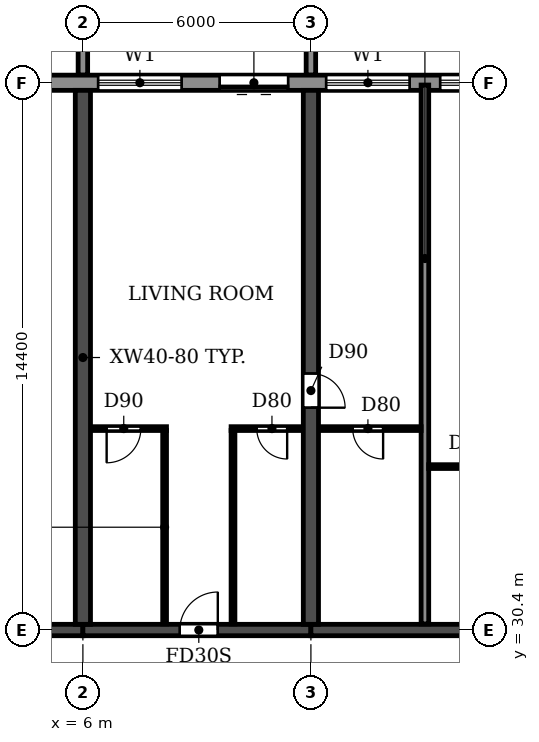
"""IFC4 building model, lengths in metres.
Left out: names, types, materials, properties, quantities, classifications, styles, units other than length and angle.
Written with IfcOpenShell. Run it as: python <this file> out.ifc"""

import sys

from ifc_helpers import new_model, si_unit, direction, frame, frame_2d, origin, place, context, subcontext, project, spatial, polyline, rectangle, outline, extrude, source, transform, mapped, element, fill, save


model = new_model("IFC4")
c1 = context("Model", 3, precision=1e-05, world=origin(), true_north=direction((0.0, 1.0)))
c2 = subcontext(c1, "Body", "Model", "MODEL_VIEW")
j1 = project(units=[si_unit("LENGTHUNIT", "METRE"), si_unit("PLANEANGLEUNIT", "RADIAN")], contexts=[c1])
p1 = place(None, origin())
s1 = spatial("IfcSite", under=j1, at=p1, CompositionType="ELEMENT")
p2 = place(p1, origin())
s2 = spatial("IfcBuilding", under=s1, at=p2, CompositionType="ELEMENT")
p3 = place(p2, frame((0.0, 0.0, 26.7)))
s3 = spatial("IfcBuildingStorey", under=s2, at=p3, CompositionType="ELEMENT", Elevation=26.7)
p4 = place(p3, frame((6.0, 30.55, 0.0), z_axis=(0.0, 0.0, 1.0), x_axis=(0.0, 1.0, 0.0)))
e1 = element("IfcWall", 1, at=p4, inside=s3, PredefinedType="SHEAR", context=c2, shape_type="SweptSolid", body=[
    extrude(rectangle(XDim=14.05, YDim=0.4, at=frame_2d((7.025, 0.0))), origin(), (0.0, 0.0, 1.0), 3.05),
])
p5 = place(p3, frame((12.0, 30.55, 0.0), z_axis=(0.0, 0.0, 1.0), x_axis=(0.0, 1.0, 0.0)))
e2 = element("IfcWall", 2, at=p5, inside=s3, PredefinedType="SHEAR", context=c2, shape_type="SweptSolid", body=[
    extrude(rectangle(XDim=14.05, YDim=0.4, at=frame_2d((7.025, 0.0))), origin(), (0.0, 0.0, 1.0), 3.05),
])
p6 = place(p5, frame((5.7, 0.0, 0.0)))
e3 = element("IfcOpeningElement", 3, at=p6, cuts=e2, PredefinedType="OPENING", context=c2, shape_type="SweptSolid", body=[
    extrude(rectangle(XDim=0.9, YDim=2.1, at=frame_2d((0.45, 1.05))), frame((0.0, 0.21, 0.0), z_axis=(0.0, -1.0, 0.0), x_axis=(1.0, 0.0, 0.0)), (0.0, 0.0, 1.0), 0.42),
])
p7 = place(p3, frame((0.2, 30.4, 0.0), z_axis=(0.0, 0.0, 1.0), x_axis=(1.0, 0.0, 0.0)))
e4 = element("IfcWall", 4, at=p7, inside=s3, PredefinedType="SHEAR", context=c2, shape_type="SweptSolid", body=[
    extrude(rectangle(XDim=5.8, YDim=0.3, at=frame_2d((2.9, 0.0))), origin(), (0.0, 0.0, 1.0), 2.45),
])
p8 = place(p7, frame((2.3, 0.0, 0.0)))
e5 = element("IfcOpeningElement", 5, at=p8, cuts=e4, PredefinedType="OPENING", context=c2, shape_type="SweptSolid", body=[
    extrude(rectangle(XDim=1.0, YDim=2.1, at=frame_2d((0.5, 1.05))), frame((0.0, 0.16, 0.0), z_axis=(0.0, -1.0, 0.0), x_axis=(1.0, 0.0, 0.0)), (0.0, 0.0, 1.0), 0.32),
])
p9 = place(p3, frame((6.0, 30.4, 0.0), z_axis=(0.0, 0.0, 1.0), x_axis=(1.0, 0.0, 0.0)))
e6 = element("IfcWall", 6, at=p9, inside=s3, PredefinedType="SHEAR", context=c2, shape_type="SweptSolid", body=[
    extrude(rectangle(XDim=6.0, YDim=0.3, at=frame_2d((3.0, 0.0))), origin(), (0.0, 0.0, 1.0), 2.45),
])
p10 = place(p9, frame((2.55, 0.0, 0.0)))
e7 = element("IfcOpeningElement", 7, at=p10, cuts=e6, PredefinedType="OPENING", context=c2, shape_type="SweptSolid", body=[
    extrude(rectangle(XDim=1.0, YDim=2.1, at=frame_2d((0.5, 1.05))), frame((0.0, 0.16, 0.0), z_axis=(0.0, -1.0, 0.0), x_axis=(1.0, 0.0, 0.0)), (0.0, 0.0, 1.0), 0.32),
])
p11 = place(p3, frame((12.0, 30.4, 0.0), z_axis=(0.0, 0.0, 1.0), x_axis=(1.0, 0.0, 0.0)))
e8 = element("IfcWall", 8, at=p11, inside=s3, PredefinedType="SHEAR", context=c2, shape_type="SweptSolid", body=[
    extrude(rectangle(XDim=6.0, YDim=0.3, at=frame_2d((3.0, 0.0))), origin(), (0.0, 0.0, 1.0), 2.45),
])
p12 = place(p3, frame((97.317, 44.8, 0.0), z_axis=(0.0, 0.0, 1.0), x_axis=(-1.0, 0.0, 0.0)))
e9 = element("IfcWall", 9, at=p12, inside=s3, PredefinedType="STANDARD", context=c2, shape_type="SweptSolid", body=[
    extrude(rectangle(XDim=92.634, YDim=0.4, at=frame_2d((46.317, 0.0))), origin(), (0.0, 0.0, 1.0), 3.05),
])
p13 = place(p12, frame((88.717, 0.0, 0.9)))
e10 = element("IfcOpeningElement", 10, at=p13, cuts=e9, PredefinedType="OPENING", context=c2, shape_type="SweptSolid", body=[
    extrude(rectangle(XDim=2.2, YDim=1.5, at=frame_2d((1.1, 0.75))), frame((0.0, 0.21, 0.0), z_axis=(0.0, -1.0, 0.0), x_axis=(1.0, 0.0, 0.0)), (0.0, 0.0, 1.0), 0.42),
])
p14 = place(p12, frame((85.917, 0.0, 0.0)))
e11 = element("IfcOpeningElement", 11, at=p14, cuts=e9, PredefinedType="OPENING", context=c2, shape_type="SweptSolid", body=[
    extrude(rectangle(XDim=1.8, YDim=2.4, at=frame_2d((0.9, 1.2))), frame((0.0, 0.21, 0.0), z_axis=(0.0, -1.0, 0.0), x_axis=(1.0, 0.0, 0.0)), (0.0, 0.0, 1.0), 0.42),
])
p15 = place(p12, frame((82.717, 0.0, 0.9)))
e12 = element("IfcOpeningElement", 12, at=p15, cuts=e9, PredefinedType="OPENING", context=c2, shape_type="SweptSolid", body=[
    extrude(rectangle(XDim=2.2, YDim=1.5, at=frame_2d((1.1, 0.75))), frame((0.0, 0.21, 0.0), z_axis=(0.0, -1.0, 0.0), x_axis=(1.0, 0.0, 0.0)), (0.0, 0.0, 1.0), 0.42),
])
p16 = place(p12, frame((79.717, 0.0, 0.9)))
e13 = element("IfcOpeningElement", 13, at=p16, cuts=e9, PredefinedType="OPENING", context=c2, shape_type="SweptSolid", body=[
    extrude(rectangle(XDim=2.2, YDim=1.5, at=frame_2d((1.1, 0.75))), frame((0.0, 0.21, 0.0), z_axis=(0.0, -1.0, 0.0), x_axis=(1.0, 0.0, 0.0)), (0.0, 0.0, 1.0), 0.42),
])
p17 = place(p12, frame((76.917, 0.0, 0.0)))
e14 = element("IfcOpeningElement", 14, at=p17, cuts=e9, PredefinedType="OPENING", context=c2, shape_type="SweptSolid", body=[
    extrude(rectangle(XDim=1.8, YDim=2.4, at=frame_2d((0.9, 1.2))), frame((0.0, 0.21, 0.0), z_axis=(0.0, -1.0, 0.0), x_axis=(1.0, 0.0, 0.0)), (0.0, 0.0, 1.0), 0.42),
])
p18 = place(p12, frame((73.717, 0.0, 0.9)))
e15 = element("IfcOpeningElement", 15, at=p18, cuts=e9, PredefinedType="OPENING", context=c2, shape_type="SweptSolid", body=[
    extrude(rectangle(XDim=2.2, YDim=1.5, at=frame_2d((1.1, 0.75))), frame((0.0, 0.21, 0.0), z_axis=(0.0, -1.0, 0.0), x_axis=(1.0, 0.0, 0.0)), (0.0, 0.0, 1.0), 0.42),
])
p19 = place(p12, frame((70.717, 0.0, 0.9)))
e16 = element("IfcOpeningElement", 16, at=p19, cuts=e9, PredefinedType="OPENING", context=c2, shape_type="SweptSolid", body=[
    extrude(rectangle(XDim=2.2, YDim=1.5, at=frame_2d((1.1, 0.75))), frame((0.0, 0.21, 0.0), z_axis=(0.0, -1.0, 0.0), x_axis=(1.0, 0.0, 0.0)), (0.0, 0.0, 1.0), 0.42),
])
p20 = place(p12, frame((67.717, 0.0, 0.9)))
e17 = element("IfcOpeningElement", 17, at=p20, cuts=e9, PredefinedType="OPENING", context=c2, shape_type="SweptSolid", body=[
    extrude(rectangle(XDim=2.2, YDim=1.5, at=frame_2d((1.1, 0.75))), frame((0.0, 0.21, 0.0), z_axis=(0.0, -1.0, 0.0), x_axis=(1.0, 0.0, 0.0)), (0.0, 0.0, 1.0), 0.42),
])
p21 = place(p12, frame((64.917, 0.0, 0.0)))
e18 = element("IfcOpeningElement", 18, at=p21, cuts=e9, PredefinedType="OPENING", context=c2, shape_type="SweptSolid", body=[
    extrude(rectangle(XDim=1.8, YDim=2.4, at=frame_2d((0.9, 1.2))), frame((0.0, 0.21, 0.0), z_axis=(0.0, -1.0, 0.0), x_axis=(1.0, 0.0, 0.0)), (0.0, 0.0, 1.0), 0.42),
])
p22 = place(p12, frame((61.717, 0.0, 0.9)))
e19 = element("IfcOpeningElement", 19, at=p22, cuts=e9, PredefinedType="OPENING", context=c2, shape_type="SweptSolid", body=[
    extrude(rectangle(XDim=2.2, YDim=1.5, at=frame_2d((1.1, 0.75))), frame((0.0, 0.21, 0.0), z_axis=(0.0, -1.0, 0.0), x_axis=(1.0, 0.0, 0.0)), (0.0, 0.0, 1.0), 0.42),
])
p23 = place(p12, frame((58.717, 0.0, 0.9)))
e20 = element("IfcOpeningElement", 20, at=p23, cuts=e9, PredefinedType="OPENING", context=c2, shape_type="SweptSolid", body=[
    extrude(rectangle(XDim=2.2, YDim=1.5, at=frame_2d((1.1, 0.75))), frame((0.0, 0.21, 0.0), z_axis=(0.0, -1.0, 0.0), x_axis=(1.0, 0.0, 0.0)), (0.0, 0.0, 1.0), 0.42),
])
p24 = place(p12, frame((55.917, 0.0, 0.0)))
e21 = element("IfcOpeningElement", 21, at=p24, cuts=e9, PredefinedType="OPENING", context=c2, shape_type="SweptSolid", body=[
    extrude(rectangle(XDim=1.8, YDim=2.4, at=frame_2d((0.9, 1.2))), frame((0.0, 0.21, 0.0), z_axis=(0.0, -1.0, 0.0), x_axis=(1.0, 0.0, 0.0)), (0.0, 0.0, 1.0), 0.42),
])
p25 = place(p12, frame((52.917, 0.0, 0.0)))
e22 = element("IfcOpeningElement", 22, at=p25, cuts=e9, PredefinedType="OPENING", context=c2, shape_type="SweptSolid", body=[
    extrude(rectangle(XDim=1.8, YDim=2.4, at=frame_2d((0.9, 1.2))), frame((0.0, 0.21, 0.0), z_axis=(0.0, -1.0, 0.0), x_axis=(1.0, 0.0, 0.0)), (0.0, 0.0, 1.0), 0.42),
])
p26 = place(p12, frame((49.717, 0.0, 0.9)))
e23 = element("IfcOpeningElement", 23, at=p26, cuts=e9, PredefinedType="OPENING", context=c2, shape_type="SweptSolid", body=[
    extrude(rectangle(XDim=2.2, YDim=1.5, at=frame_2d((1.1, 0.75))), frame((0.0, 0.21, 0.0), z_axis=(0.0, -1.0, 0.0), x_axis=(1.0, 0.0, 0.0)), (0.0, 0.0, 1.0), 0.42),
])
p27 = place(p12, frame((46.917, 0.0, 0.0)))
e24 = element("IfcOpeningElement", 24, at=p27, cuts=e9, PredefinedType="OPENING", context=c2, shape_type="SweptSolid", body=[
    extrude(rectangle(XDim=1.8, YDim=2.4, at=frame_2d((0.9, 1.2))), frame((0.0, 0.21, 0.0), z_axis=(0.0, -1.0, 0.0), x_axis=(1.0, 0.0, 0.0)), (0.0, 0.0, 1.0), 0.42),
])
p28 = place(p12, frame((43.717, 0.0, 0.9)))
e25 = element("IfcOpeningElement", 25, at=p28, cuts=e9, PredefinedType="OPENING", context=c2, shape_type="SweptSolid", body=[
    extrude(rectangle(XDim=2.2, YDim=1.5, at=frame_2d((1.1, 0.75))), frame((0.0, 0.21, 0.0), z_axis=(0.0, -1.0, 0.0), x_axis=(1.0, 0.0, 0.0)), (0.0, 0.0, 1.0), 0.42),
])
p29 = place(p12, frame((40.717, 0.0, 0.9)))
e26 = element("IfcOpeningElement", 26, at=p29, cuts=e9, PredefinedType="OPENING", context=c2, shape_type="SweptSolid", body=[
    extrude(rectangle(XDim=2.2, YDim=1.5, at=frame_2d((1.1, 0.75))), frame((0.0, 0.21, 0.0), z_axis=(0.0, -1.0, 0.0), x_axis=(1.0, 0.0, 0.0)), (0.0, 0.0, 1.0), 0.42),
])
p30 = place(p12, frame((37.917, 0.0, 0.0)))
e27 = element("IfcOpeningElement", 27, at=p30, cuts=e9, PredefinedType="OPENING", context=c2, shape_type="SweptSolid", body=[
    extrude(rectangle(XDim=1.8, YDim=2.4, at=frame_2d((0.9, 1.2))), frame((0.0, 0.21, 0.0), z_axis=(0.0, -1.0, 0.0), x_axis=(1.0, 0.0, 0.0)), (0.0, 0.0, 1.0), 0.42),
])
p31 = place(p12, frame((34.917, 0.0, 0.0)))
e28 = element("IfcOpeningElement", 28, at=p31, cuts=e9, PredefinedType="OPENING", context=c2, shape_type="SweptSolid", body=[
    extrude(rectangle(XDim=1.8, YDim=2.4, at=frame_2d((0.9, 1.2))), frame((0.0, 0.21, 0.0), z_axis=(0.0, -1.0, 0.0), x_axis=(1.0, 0.0, 0.0)), (0.0, 0.0, 1.0), 0.42),
])
p32 = place(p12, frame((31.717, 0.0, 0.9)))
e29 = element("IfcOpeningElement", 29, at=p32, cuts=e9, PredefinedType="OPENING", context=c2, shape_type="SweptSolid", body=[
    extrude(rectangle(XDim=2.2, YDim=1.5, at=frame_2d((1.1, 0.75))), frame((0.0, 0.21, 0.0), z_axis=(0.0, -1.0, 0.0), x_axis=(1.0, 0.0, 0.0)), (0.0, 0.0, 1.0), 0.42),
])
p33 = place(p12, frame((28.717, 0.0, 0.9)))
e30 = element("IfcOpeningElement", 30, at=p33, cuts=e9, PredefinedType="OPENING", context=c2, shape_type="SweptSolid", body=[
    extrude(rectangle(XDim=2.2, YDim=1.5, at=frame_2d((1.1, 0.75))), frame((0.0, 0.21, 0.0), z_axis=(0.0, -1.0, 0.0), x_axis=(1.0, 0.0, 0.0)), (0.0, 0.0, 1.0), 0.42),
])
p34 = place(p12, frame((25.717, 0.0, 0.9)))
e31 = element("IfcOpeningElement", 31, at=p34, cuts=e9, PredefinedType="OPENING", context=c2, shape_type="SweptSolid", body=[
    extrude(rectangle(XDim=2.2, YDim=1.5, at=frame_2d((1.1, 0.75))), frame((0.0, 0.21, 0.0), z_axis=(0.0, -1.0, 0.0), x_axis=(1.0, 0.0, 0.0)), (0.0, 0.0, 1.0), 0.42),
])
p35 = place(p12, frame((22.717, 0.0, 0.9)))
e32 = element("IfcOpeningElement", 32, at=p35, cuts=e9, PredefinedType="OPENING", context=c2, shape_type="SweptSolid", body=[
    extrude(rectangle(XDim=2.2, YDim=1.5, at=frame_2d((1.1, 0.75))), frame((0.0, 0.21, 0.0), z_axis=(0.0, -1.0, 0.0), x_axis=(1.0, 0.0, 0.0)), (0.0, 0.0, 1.0), 0.42),
])
p36 = place(p12, frame((19.917, 0.0, 0.0)))
e33 = element("IfcOpeningElement", 33, at=p36, cuts=e9, PredefinedType="OPENING", context=c2, shape_type="SweptSolid", body=[
    extrude(rectangle(XDim=1.8, YDim=2.4, at=frame_2d((0.9, 1.2))), frame((0.0, 0.21, 0.0), z_axis=(0.0, -1.0, 0.0), x_axis=(1.0, 0.0, 0.0)), (0.0, 0.0, 1.0), 0.42),
])
p37 = place(p12, frame((16.717, 0.0, 0.9)))
e34 = element("IfcOpeningElement", 34, at=p37, cuts=e9, PredefinedType="OPENING", context=c2, shape_type="SweptSolid", body=[
    extrude(rectangle(XDim=2.2, YDim=1.5, at=frame_2d((1.1, 0.75))), frame((0.0, 0.21, 0.0), z_axis=(0.0, -1.0, 0.0), x_axis=(1.0, 0.0, 0.0)), (0.0, 0.0, 1.0), 0.42),
])
p38 = place(p12, frame((13.717, 0.0, 0.9)))
e35 = element("IfcOpeningElement", 35, at=p38, cuts=e9, PredefinedType="OPENING", context=c2, shape_type="SweptSolid", body=[
    extrude(rectangle(XDim=2.2, YDim=1.5, at=frame_2d((1.1, 0.75))), frame((0.0, 0.21, 0.0), z_axis=(0.0, -1.0, 0.0), x_axis=(1.0, 0.0, 0.0)), (0.0, 0.0, 1.0), 0.42),
])
p39 = place(p12, frame((10.717, 0.0, 0.9)))
e36 = element("IfcOpeningElement", 36, at=p39, cuts=e9, PredefinedType="OPENING", context=c2, shape_type="SweptSolid", body=[
    extrude(rectangle(XDim=2.2, YDim=1.5, at=frame_2d((1.1, 0.75))), frame((0.0, 0.21, 0.0), z_axis=(0.0, -1.0, 0.0), x_axis=(1.0, 0.0, 0.0)), (0.0, 0.0, 1.0), 0.42),
])
p40 = place(p12, frame((7.917, 0.0, 0.0)))
e37 = element("IfcOpeningElement", 37, at=p40, cuts=e9, PredefinedType="OPENING", context=c2, shape_type="SweptSolid", body=[
    extrude(rectangle(XDim=1.8, YDim=2.4, at=frame_2d((0.9, 1.2))), frame((0.0, 0.21, 0.0), z_axis=(0.0, -1.0, 0.0), x_axis=(1.0, 0.0, 0.0)), (0.0, 0.0, 1.0), 0.42),
])
p41 = place(p12, frame((4.917, 0.0, 0.0)))
e38 = element("IfcOpeningElement", 38, at=p41, cuts=e9, PredefinedType="OPENING", context=c2, shape_type="SweptSolid", body=[
    extrude(rectangle(XDim=1.8, YDim=2.4, at=frame_2d((0.9, 1.2))), frame((0.0, 0.21, 0.0), z_axis=(0.0, -1.0, 0.0), x_axis=(1.0, 0.0, 0.0)), (0.0, 0.0, 1.0), 0.42),
])
p42 = place(p12, frame((1.717, 0.0, 0.9)))
e39 = element("IfcOpeningElement", 39, at=p42, cuts=e9, PredefinedType="OPENING", context=c2, shape_type="SweptSolid", body=[
    extrude(rectangle(XDim=2.2, YDim=1.5, at=frame_2d((1.1, 0.75))), frame((0.0, 0.21, 0.0), z_axis=(0.0, -1.0, 0.0), x_axis=(1.0, 0.0, 0.0)), (0.0, 0.0, 1.0), 0.42),
])
m1 = source(origin(), c2, "Body", "SweptSolid", [
    extrude(outline(polyline([(0.0, 0.0), (0.25, 0.0), (0.25, 3.1), (0.0, 3.1), (0.0, 0.0)])), origin(), (0.0, 0.0, 1.0), 3.1),
])
for number, where in (
    (40, (5.875, 45.0, 0.0)),
    (41, (11.875, 45.0, 0.0)),
):
    element("IfcWall", number, at=place(p3, frame(where)), inside=s3, PredefinedType="STANDARD", context=c2, shape_type="MappedRepresentation", body=[
        mapped(m1, transform((0.0, 0.0, 0.0))),
    ])
p43 = place(p3, frame((15.0, 30.56, 0.0), z_axis=(0.0, 0.0, 1.0), x_axis=(0.0, 1.0, 0.0)))
e42 = element("IfcWall", 42, at=p43, inside=s3, PredefinedType="PARTITIONING", context=c2, shape_type="SweptSolid", body=[
    extrude(rectangle(XDim=14.18, YDim=0.2, at=frame_2d((7.09, 0.0))), origin(), (0.0, 0.0, 1.0), 3.05),
])
p44 = place(p3, frame((15.1, 34.7, 0.0), z_axis=(0.0, 0.0, 1.0), x_axis=(1.0, 0.0, 0.0)))
e43 = element("IfcWall", 43, at=p44, inside=s3, PredefinedType="PARTITIONING", context=c2, shape_type="SweptSolid", body=[
    extrude(rectangle(XDim=2.69, YDim=0.1, at=frame_2d((1.345, 0.0))), origin(), (0.0, 0.0, 1.0), 3.05),
])
p45 = place(p44, frame((1.0, 0.0, 0.0)))
e44 = element("IfcOpeningElement", 44, at=p45, cuts=e43, PredefinedType="OPENING", context=c2, shape_type="SweptSolid", body=[
    extrude(rectangle(XDim=0.8, YDim=2.1, at=frame_2d((0.4, 1.05))), frame((0.0, 0.06, 0.0), z_axis=(0.0, -1.0, 0.0), x_axis=(1.0, 0.0, 0.0)), (0.0, 0.0, 1.0), 0.12),
])
p46 = place(p3, frame((6.21, 35.7, 0.0), z_axis=(0.0, 0.0, 1.0), x_axis=(1.0, 0.0, 0.0)))
e45 = element("IfcWall", 45, at=p46, inside=s3, PredefinedType="PARTITIONING", context=c2, shape_type="SweptSolid", body=[
    extrude(rectangle(XDim=1.99, YDim=0.1, at=frame_2d((0.995, 0.0))), origin(), (0.0, 0.0, 1.0), 3.05),
])
p47 = place(p46, frame((0.415, 0.0, 0.0)))
e46 = element("IfcOpeningElement", 46, at=p47, cuts=e45, PredefinedType="OPENING", context=c2, shape_type="SweptSolid", body=[
    extrude(rectangle(XDim=0.9, YDim=2.1, at=frame_2d((0.45, 1.05))), frame((0.0, 0.06, 0.0), z_axis=(0.0, -1.0, 0.0), x_axis=(1.0, 0.0, 0.0)), (0.0, 0.0, 1.0), 0.12),
])
p48 = place(p3, frame((9.9, 35.7, 0.0), z_axis=(0.0, 0.0, 1.0), x_axis=(1.0, 0.0, 0.0)))
e47 = element("IfcWall", 47, at=p48, inside=s3, PredefinedType="PARTITIONING", context=c2, shape_type="SweptSolid", body=[
    extrude(rectangle(XDim=1.89, YDim=0.1, at=frame_2d((0.945, 0.0))), origin(), (0.0, 0.0, 1.0), 3.05),
])
p49 = place(p48, frame((0.675, 0.0, 0.0)))
e48 = element("IfcOpeningElement", 48, at=p49, cuts=e47, PredefinedType="OPENING", context=c2, shape_type="SweptSolid", body=[
    extrude(rectangle(XDim=0.8, YDim=2.1, at=frame_2d((0.4, 1.05))), frame((0.0, 0.06, 0.0), z_axis=(0.0, -1.0, 0.0), x_axis=(1.0, 0.0, 0.0)), (0.0, 0.0, 1.0), 0.12),
])
p50 = place(p3, frame((12.21, 35.7, 0.0), z_axis=(0.0, 0.0, 1.0), x_axis=(1.0, 0.0, 0.0)))
e49 = element("IfcWall", 49, at=p50, inside=s3, PredefinedType="PARTITIONING", context=c2, shape_type="SweptSolid", body=[
    extrude(rectangle(XDim=2.69, YDim=0.1, at=frame_2d((1.345, 0.0))), origin(), (0.0, 0.0, 1.0), 3.05),
])
p51 = place(p50, frame((0.89, 0.0, 0.0)))
e50 = element("IfcOpeningElement", 50, at=p51, cuts=e49, PredefinedType="OPENING", context=c2, shape_type="SweptSolid", body=[
    extrude(rectangle(XDim=0.8, YDim=2.1, at=frame_2d((0.4, 1.05))), frame((0.0, 0.06, 0.0), z_axis=(0.0, -1.0, 0.0), x_axis=(1.0, 0.0, 0.0)), (0.0, 0.0, 1.0), 0.12),
])
for number, where, z_axis, x_axis in (
    (51, (8.15, 30.56, 0.0), (0.0, 0.0, 1.0), (0.0, 1.0, 0.0)),
    (52, (9.95, 30.56, 0.0), (0.0, 0.0, 1.0), (0.0, 1.0, 0.0)),
):
    element("IfcWall", number, at=place(p3, frame(where, z_axis=z_axis, x_axis=x_axis)), inside=s3, PredefinedType="PARTITIONING", context=c2, shape_type="SweptSolid", body=[
        extrude(rectangle(XDim=5.09, YDim=0.1, at=frame_2d((2.545, 0.0))), origin(), (0.0, 0.0, 1.0), 3.05),
    ])
p52 = place(p13, origin())
e53 = element("IfcWindow", 53, at=p52, inside=s3, PartitioningType="DOUBLE_PANEL_HORIZONTAL", PredefinedType="WINDOW", context=c2, shape_type="SweptSolid", body=[
    extrude(rectangle(XDim=2.2, YDim=1.5, at=frame_2d((1.1, 0.75))), frame((0.0, 0.03, 0.0), z_axis=(0.0, -1.0, 0.0), x_axis=(1.0, 0.0, 0.0)), (0.0, 0.0, 1.0), 0.06),
])
fill(e10, e53)
p53 = place(p14, origin())
e54 = element("IfcDoor", 54, at=p53, inside=s3, OperationType="DOUBLE_DOOR_SLIDING", PredefinedType="DOOR", context=c2, shape_type="SweptSolid", body=[
    extrude(rectangle(XDim=1.8, YDim=2.4, at=frame_2d((0.9, 1.2))), frame((0.0, 0.025, 0.0), z_axis=(0.0, -1.0, 0.0), x_axis=(1.0, 0.0, 0.0)), (0.0, 0.0, 1.0), 0.05),
])
fill(e11, e54)
p54 = place(p15, origin())
e55 = element("IfcWindow", 55, at=p54, inside=s3, PartitioningType="DOUBLE_PANEL_HORIZONTAL", PredefinedType="WINDOW", context=c2, shape_type="SweptSolid", body=[
    extrude(rectangle(XDim=2.2, YDim=1.5, at=frame_2d((1.1, 0.75))), frame((0.0, 0.03, 0.0), z_axis=(0.0, -1.0, 0.0), x_axis=(1.0, 0.0, 0.0)), (0.0, 0.0, 1.0), 0.06),
])
fill(e12, e55)
p55 = place(p16, origin())
e56 = element("IfcWindow", 56, at=p55, inside=s3, PartitioningType="DOUBLE_PANEL_HORIZONTAL", PredefinedType="WINDOW", context=c2, shape_type="SweptSolid", body=[
    extrude(rectangle(XDim=2.2, YDim=1.5, at=frame_2d((1.1, 0.75))), frame((0.0, 0.03, 0.0), z_axis=(0.0, -1.0, 0.0), x_axis=(1.0, 0.0, 0.0)), (0.0, 0.0, 1.0), 0.06),
])
fill(e13, e56)
p56 = place(p51, frame((0.8, 0.0, 0.0), z_axis=(0.0, 0.0, 1.0), x_axis=(-1.0, 0.0, 0.0)))
e57 = element("IfcDoor", 57, at=p56, inside=s3, OperationType="SINGLE_SWING_LEFT", PredefinedType="DOOR", context=c2, shape_type="SweptSolid", body=[
    extrude(rectangle(XDim=0.8, YDim=2.1, at=frame_2d((0.4, 1.05))), frame((0.0, 0.025, 0.0), z_axis=(0.0, -1.0, 0.0), x_axis=(1.0, 0.0, 0.0)), (0.0, 0.0, 1.0), 0.05),
])
fill(e50, e57)
p57 = place(p47, frame((0.9, 0.0, 0.0), z_axis=(0.0, 0.0, 1.0), x_axis=(-1.0, 0.0, 0.0)))
e58 = element("IfcDoor", 58, at=p57, inside=s3, OperationType="SINGLE_SWING_RIGHT", PredefinedType="DOOR", context=c2, shape_type="SweptSolid", body=[
    extrude(rectangle(XDim=0.9, YDim=2.1, at=frame_2d((0.45, 1.05))), frame((0.0, 0.025, 0.0), z_axis=(0.0, -1.0, 0.0), x_axis=(1.0, 0.0, 0.0)), (0.0, 0.0, 1.0), 0.05),
])
fill(e46, e58)
p58 = place(p10, origin())
e59 = element("IfcDoor", 59, at=p58, inside=s3, OperationType="SINGLE_SWING_RIGHT", PredefinedType="DOOR", context=c2, shape_type="SweptSolid", body=[
    extrude(rectangle(XDim=1.0, YDim=2.1, at=frame_2d((0.5, 1.05))), frame((0.0, 0.025, 0.0), z_axis=(0.0, -1.0, 0.0), x_axis=(1.0, 0.0, 0.0)), (0.0, 0.0, 1.0), 0.05),
])
fill(e7, e59)
p59 = place(p49, frame((0.8, 0.0, 0.0), z_axis=(0.0, 0.0, 1.0), x_axis=(-1.0, 0.0, 0.0)))
e60 = element("IfcDoor", 60, at=p59, inside=s3, OperationType="SINGLE_SWING_LEFT", PredefinedType="DOOR", context=c2, shape_type="SweptSolid", body=[
    extrude(rectangle(XDim=0.8, YDim=2.1, at=frame_2d((0.4, 1.05))), frame((0.0, 0.025, 0.0), z_axis=(0.0, -1.0, 0.0), x_axis=(1.0, 0.0, 0.0)), (0.0, 0.0, 1.0), 0.05),
])
fill(e48, e60)
p60 = place(p6, frame((0.9, 0.0, 0.0), z_axis=(0.0, 0.0, 1.0), x_axis=(-1.0, 0.0, 0.0)))
e61 = element("IfcDoor", 61, at=p60, inside=s3, OperationType="SINGLE_SWING_RIGHT", PredefinedType="DOOR", context=c2, shape_type="SweptSolid", body=[
    extrude(rectangle(XDim=0.9, YDim=2.1, at=frame_2d((0.45, 1.05))), frame((0.0, 0.025, 0.0), z_axis=(0.0, -1.0, 0.0), x_axis=(1.0, 0.0, 0.0)), (0.0, 0.0, 1.0), 0.05),
])
fill(e3, e61)
save(model, sys.argv[1])
